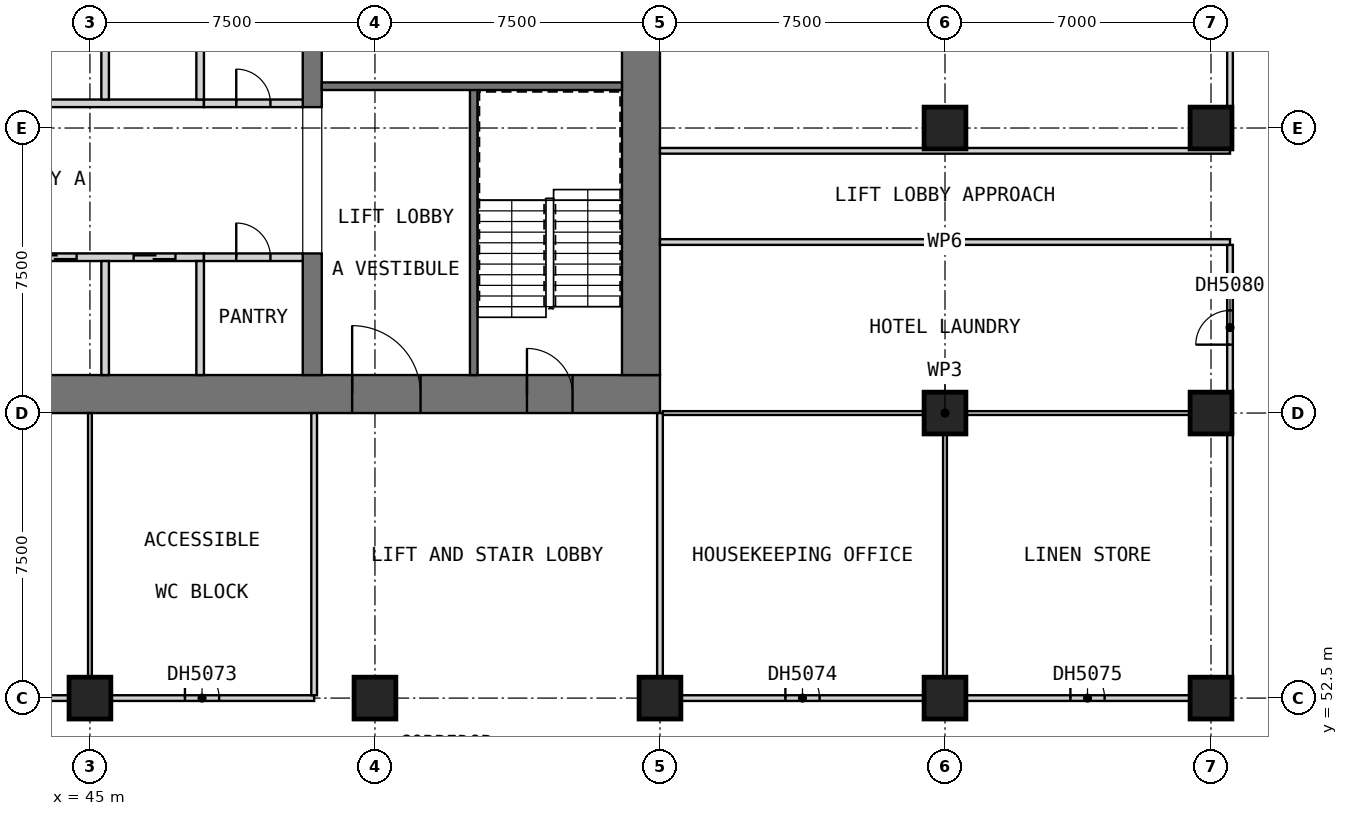
"""IFC4 building model, lengths in metres.
Left out: names, types, materials, properties, quantities, classifications, styles, units other than length and angle.
Written with IfcOpenShell. Run it as: python <this file> out.ifc"""

import sys

from ifc_helpers import new_model, si_unit, direction, frame, frame_2d, origin, origin_2d, place, context, subcontext, project, spatial, rectangle, extrude, element, fill, save


model = new_model("IFC4")
c1 = context("Model", 3, precision=1e-05, world=origin(), true_north=direction((0.0, 1.0)))
c2 = subcontext(c1, "Body", "Model", "MODEL_VIEW")
j1 = project(units=[si_unit("LENGTHUNIT", "METRE"), si_unit("PLANEANGLEUNIT", "RADIAN")], contexts=[c1])
p1 = place(None, origin())
s1 = spatial("IfcSite", under=j1, at=p1, CompositionType="ELEMENT")
p2 = place(p1, origin())
s2 = spatial("IfcBuilding", under=s1, at=p2, CompositionType="ELEMENT")
p3 = place(p2, frame((0.0, 0.0, 79.1)))
s3 = spatial("IfcBuildingStorey", under=s2, at=p3, CompositionType="ELEMENT", Elevation=79.1)
for number, where, z_axis, x_axis in (
    (1, (45.0, 52.5, 0.0), (0.0, 0.0, 1.0), (1.0, 0.0, 0.0)),
    (2, (52.5, 52.5, 0.0), (0.0, 0.0, 1.0), (1.0, 0.0, 0.0)),
    (3, (60.0, 52.5, 0.0), (0.0, 0.0, 1.0), (1.0, 0.0, 0.0)),
    (4, (67.5, 52.5, 0.0), (0.0, 0.0, 1.0), (1.0, 0.0, 0.0)),
    (5, (67.5, 60.0, 0.0), (0.0, 0.0, 1.0), (1.0, 0.0, 0.0)),
    (6, (67.5, 67.5, 0.0), (0.0, 0.0, 1.0), (1.0, 0.0, 0.0)),
    (7, (74.5, 52.5, 0.0), (0.0, 0.0, 1.0), (1.0, 0.0, 0.0)),
    (8, (74.5, 60.0, 0.0), (0.0, 0.0, 1.0), (1.0, 0.0, 0.0)),
    (9, (74.5, 67.5, 0.0), (0.0, 0.0, 1.0), (1.0, 0.0, 0.0)),
):
    element("IfcColumn", number, at=place(p3, frame(where, z_axis=z_axis, x_axis=x_axis)), inside=s3, PredefinedType="COLUMN", context=c2, shape_type="SweptSolid", body=[
        extrude(rectangle(XDim=1.1, YDim=1.1, at=origin_2d()), origin(), (0.0, 0.0, 1.0), 3.6),
    ])
p4 = place(p3, frame((30.0, 60.5, 0.0), z_axis=(0.0, 0.0, 1.0), x_axis=(1.0, 0.0, 0.0)))
e10 = element("IfcWall", 10, at=p4, inside=s3, PredefinedType="SHEAR", context=c2, shape_type="SweptSolid", body=[
    extrude(rectangle(XDim=30.0, YDim=1.0, at=frame_2d((15.0, 0.0))), origin(), (0.0, 0.0, 1.0), 3.6),
])
p5 = place(p4, frame((21.9, 0.0, 0.0)))
e11 = element("IfcOpeningElement", 11, at=p5, cuts=e10, PredefinedType="OPENING", context=c2, shape_type="SweptSolid", body=[
    extrude(rectangle(XDim=1.8, YDim=2.1, at=frame_2d((0.9, 1.05))), frame((0.0, 0.51, 0.0), z_axis=(0.0, -1.0, 0.0), x_axis=(1.0, 0.0, 0.0)), (0.0, 0.0, 1.0), 1.02),
])
p6 = place(p4, frame((26.5, 0.0, 0.0)))
e12 = element("IfcOpeningElement", 12, at=p6, cuts=e10, PredefinedType="OPENING", context=c2, shape_type="SweptSolid", body=[
    extrude(rectangle(XDim=1.2, YDim=2.1, at=frame_2d((0.6, 1.05))), frame((0.0, 0.51, 0.0), z_axis=(0.0, -1.0, 0.0), x_axis=(1.0, 0.0, 0.0)), (0.0, 0.0, 1.0), 1.02),
])
p7 = place(p3, frame((59.5, 61.0, 0.0), z_axis=(0.0, 0.0, 1.0), x_axis=(0.0, 1.0, 0.0)))
e13 = element("IfcWall", 13, at=p7, inside=s3, PredefinedType="SHEAR", context=c2, shape_type="SweptSolid", body=[
    extrude(rectangle(XDim=20.5, YDim=1.0, at=frame_2d((10.25, 0.0))), origin(), (0.0, 0.0, 1.0), 3.6),
])
p8 = place(p7, frame((14.5, 0.0, 0.0)))
e14 = element("IfcOpeningElement", 14, at=p8, cuts=e13, PredefinedType="OPENING", context=c2, shape_type="SweptSolid", body=[
    extrude(rectangle(XDim=1.8, YDim=2.1, at=frame_2d((0.9, 1.05))), frame((0.0, 0.51, 0.0), z_axis=(0.0, -1.0, 0.0), x_axis=(1.0, 0.0, 0.0)), (0.0, 0.0, 1.0), 1.02),
])
p9 = place(p3, frame((50.85, 61.0, 0.0), z_axis=(0.0, 0.0, 1.0), x_axis=(0.0, 1.0, 0.0)))
e15 = element("IfcWall", 15, at=p9, inside=s3, PredefinedType="SHEAR", context=c2, shape_type="SweptSolid", body=[
    extrude(rectangle(XDim=3.2, YDim=0.5, at=frame_2d((1.6, 0.0))), origin(), (0.0, 0.0, 1.0), 3.6),
])
p10 = place(p3, frame((50.85, 68.05, 0.0), z_axis=(0.0, 0.0, 1.0), x_axis=(0.0, 1.0, 0.0)))
e16 = element("IfcWall", 16, at=p10, inside=s3, PredefinedType="SHEAR", context=c2, shape_type="SweptSolid", body=[
    extrude(rectangle(XDim=6.4, YDim=0.5, at=frame_2d((3.2, 0.0))), origin(), (0.0, 0.0, 1.0), 3.6),
])
p11 = place(p3, frame((35.0, 64.1, 0.0), z_axis=(0.0, 0.0, 1.0), x_axis=(1.0, 0.0, 0.0)))
e17 = element("IfcWall", 17, at=p11, inside=s3, PredefinedType="SOLIDWALL", context=c2, shape_type="SweptSolid", body=[
    extrude(rectangle(XDim=13.0, YDim=0.2, at=frame_2d((6.5, 0.0))), origin(), (0.0, 0.0, 1.0), 3.6),
])
p12 = place(p11, frame((0.75, 0.0, 0.0)))
e18 = element("IfcOpeningElement", 18, at=p12, cuts=e17, PredefinedType="OPENING", context=c2, shape_type="SweptSolid", body=[
    extrude(rectangle(XDim=1.1, YDim=2.1, at=frame_2d((0.55, 1.05))), frame((0.0, 0.11, 0.0), z_axis=(0.0, -1.0, 0.0), x_axis=(1.0, 0.0, 0.0)), (0.0, 0.0, 1.0), 0.22),
])
p13 = place(p11, frame((3.35, 0.0, 0.0)))
e19 = element("IfcOpeningElement", 19, at=p13, cuts=e17, PredefinedType="OPENING", context=c2, shape_type="SweptSolid", body=[
    extrude(rectangle(XDim=1.1, YDim=2.1, at=frame_2d((0.55, 1.05))), frame((0.0, 0.11, 0.0), z_axis=(0.0, -1.0, 0.0), x_axis=(1.0, 0.0, 0.0)), (0.0, 0.0, 1.0), 0.22),
])
p14 = place(p11, frame((5.95, 0.0, 0.0)))
e20 = element("IfcOpeningElement", 20, at=p14, cuts=e17, PredefinedType="OPENING", context=c2, shape_type="SweptSolid", body=[
    extrude(rectangle(XDim=1.1, YDim=2.1, at=frame_2d((0.55, 1.05))), frame((0.0, 0.11, 0.0), z_axis=(0.0, -1.0, 0.0), x_axis=(1.0, 0.0, 0.0)), (0.0, 0.0, 1.0), 0.22),
])
p15 = place(p11, frame((8.55, 0.0, 0.0)))
e21 = element("IfcOpeningElement", 21, at=p15, cuts=e17, PredefinedType="OPENING", context=c2, shape_type="SweptSolid", body=[
    extrude(rectangle(XDim=1.1, YDim=2.1, at=frame_2d((0.55, 1.05))), frame((0.0, 0.11, 0.0), z_axis=(0.0, -1.0, 0.0), x_axis=(1.0, 0.0, 0.0)), (0.0, 0.0, 1.0), 0.22),
])
p16 = place(p11, frame((11.15, 0.0, 0.0)))
e22 = element("IfcOpeningElement", 22, at=p16, cuts=e17, PredefinedType="OPENING", context=c2, shape_type="SweptSolid", body=[
    extrude(rectangle(XDim=1.1, YDim=2.1, at=frame_2d((0.55, 1.05))), frame((0.0, 0.11, 0.0), z_axis=(0.0, -1.0, 0.0), x_axis=(1.0, 0.0, 0.0)), (0.0, 0.0, 1.0), 0.22),
])
for number, where, z_axis, x_axis in (
    (23, (45.4, 61.0, 0.0), (0.0, 0.0, 1.0), (0.0, 1.0, 0.0)),
    (24, (47.9, 61.0, 0.0), (0.0, 0.0, 1.0), (0.0, 1.0, 0.0)),
):
    element("IfcWall", number, at=place(p3, frame(where, z_axis=z_axis, x_axis=x_axis)), inside=s3, PredefinedType="SOLIDWALL", context=c2, shape_type="SweptSolid", body=[
        extrude(rectangle(XDim=3.0, YDim=0.2, at=frame_2d((1.5, 0.0))), origin(), (0.0, 0.0, 1.0), 3.6),
    ])
p17 = place(p3, frame((48.0, 64.1, 0.0), z_axis=(0.0, 0.0, 1.0), x_axis=(1.0, 0.0, 0.0)))
e25 = element("IfcWall", 25, at=p17, inside=s3, PredefinedType="PARTITIONING", context=c2, shape_type="SweptSolid", body=[
    extrude(rectangle(XDim=2.6, YDim=0.2, at=frame_2d((1.3, 0.0))), origin(), (0.0, 0.0, 1.0), 3.35),
])
p18 = place(p17, frame((0.85, 0.0, 0.0)))
e26 = element("IfcOpeningElement", 26, at=p18, cuts=e25, PredefinedType="OPENING", context=c2, shape_type="SweptSolid", body=[
    extrude(rectangle(XDim=0.9, YDim=2.1, at=frame_2d((0.45, 1.05))), frame((0.0, 0.11, 0.0), z_axis=(0.0, -1.0, 0.0), x_axis=(1.0, 0.0, 0.0)), (0.0, 0.0, 1.0), 0.22),
])
p19 = place(p3, frame((35.0, 68.15, 0.0), z_axis=(0.0, 0.0, 1.0), x_axis=(1.0, 0.0, 0.0)))
e27 = element("IfcWall", 27, at=p19, inside=s3, PredefinedType="SOLIDWALL", context=c2, shape_type="SweptSolid", body=[
    extrude(rectangle(XDim=13.0, YDim=0.2, at=frame_2d((6.5, 0.0))), origin(), (0.0, 0.0, 1.0), 3.6),
])
p20 = place(p19, frame((0.75, 0.0, 0.0)))
e28 = element("IfcOpeningElement", 28, at=p20, cuts=e27, PredefinedType="OPENING", context=c2, shape_type="SweptSolid", body=[
    extrude(rectangle(XDim=1.1, YDim=2.1, at=frame_2d((0.55, 1.05))), frame((0.0, 0.11, 0.0), z_axis=(0.0, -1.0, 0.0), x_axis=(1.0, 0.0, 0.0)), (0.0, 0.0, 1.0), 0.22),
])
for number, where, z_axis, x_axis in (
    (29, (45.4, 68.25, 0.0), (0.0, 0.0, 1.0), (0.0, 1.0, 0.0)),
    (30, (47.9, 68.25, 0.0), (0.0, 0.0, 1.0), (0.0, 1.0, 0.0)),
):
    element("IfcWall", number, at=place(p3, frame(where, z_axis=z_axis, x_axis=x_axis)), inside=s3, PredefinedType="SOLIDWALL", context=c2, shape_type="SweptSolid", body=[
        extrude(rectangle(XDim=2.75, YDim=0.2, at=frame_2d((1.375, 0.0))), origin(), (0.0, 0.0, 1.0), 3.6),
    ])
p21 = place(p3, frame((48.0, 68.15, 0.0), z_axis=(0.0, 0.0, 1.0), x_axis=(1.0, 0.0, 0.0)))
e31 = element("IfcWall", 31, at=p21, inside=s3, PredefinedType="PARTITIONING", context=c2, shape_type="SweptSolid", body=[
    extrude(rectangle(XDim=2.6, YDim=0.2, at=frame_2d((1.3, 0.0))), origin(), (0.0, 0.0, 1.0), 3.35),
])
p22 = place(p21, frame((0.85, 0.0, 0.0)))
e32 = element("IfcOpeningElement", 32, at=p22, cuts=e31, PredefinedType="OPENING", context=c2, shape_type="SweptSolid", body=[
    extrude(rectangle(XDim=0.9, YDim=2.1, at=frame_2d((0.45, 1.05))), frame((0.0, 0.11, 0.0), z_axis=(0.0, -1.0, 0.0), x_axis=(1.0, 0.0, 0.0)), (0.0, 0.0, 1.0), 0.22),
])
p23 = place(p3, frame((55.1, 61.0, 0.0), z_axis=(0.0, 0.0, 1.0), x_axis=(0.0, 1.0, 0.0)))
e33 = element("IfcWall", 33, at=p23, inside=s3, PredefinedType="SOLIDWALL", context=c2, shape_type="SweptSolid", body=[
    extrude(rectangle(XDim=7.6, YDim=0.2, at=frame_2d((3.8, 0.0))), origin(), (0.0, 0.0, 1.0), 3.35),
])
p24 = place(p3, frame((51.1, 68.6, 0.0), z_axis=(0.0, 0.0, 1.0), x_axis=(1.0, 0.0, 0.0)))
e34 = element("IfcWall", 34, at=p24, inside=s3, PredefinedType="SOLIDWALL", context=c2, shape_type="SweptSolid", body=[
    extrude(rectangle(XDim=7.9, YDim=0.2, at=frame_2d((3.95, 0.0))), origin(), (0.0, 0.0, 1.0), 3.35),
])
p25 = place(p3, frame((33.75, 52.5, 0.0), z_axis=(0.0, 0.0, 1.0), x_axis=(1.0, 0.0, 0.0)))
e35 = element("IfcWall", 35, at=p25, inside=s3, PredefinedType="PARTITIONING", context=c2, shape_type="SweptSolid", body=[
    extrude(rectangle(XDim=17.15, YDim=0.15, at=frame_2d((8.575, 0.0))), origin(), (0.0, 0.0, 1.0), 3.35),
])
p26 = place(p25, frame((5.175, 0.0, 0.0)))
e36 = element("IfcOpeningElement", 36, at=p26, cuts=e35, PredefinedType="OPENING", context=c2, shape_type="SweptSolid", body=[
    extrude(rectangle(XDim=0.9, YDim=2.1, at=frame_2d((0.45, 1.05))), frame((0.0, 0.085, 0.0), z_axis=(0.0, -1.0, 0.0), x_axis=(1.0, 0.0, 0.0)), (0.0, 0.0, 1.0), 0.17),
])
p27 = place(p25, frame((13.75, 0.0, 0.0)))
e37 = element("IfcOpeningElement", 37, at=p27, cuts=e35, PredefinedType="OPENING", context=c2, shape_type="SweptSolid", body=[
    extrude(rectangle(XDim=0.9, YDim=2.1, at=frame_2d((0.45, 1.05))), frame((0.0, 0.085, 0.0), z_axis=(0.0, -1.0, 0.0), x_axis=(1.0, 0.0, 0.0)), (0.0, 0.0, 1.0), 0.17),
])
p28 = place(p3, frame((60.0, 52.5, 0.0), z_axis=(0.0, 0.0, 1.0), x_axis=(1.0, 0.0, 0.0)))
e38 = element("IfcWall", 38, at=p28, inside=s3, PredefinedType="PARTITIONING", context=c2, shape_type="SweptSolid", body=[
    extrude(rectangle(XDim=15.0, YDim=0.15, at=frame_2d((7.5, 0.0))), origin(), (0.0, 0.0, 1.0), 3.35),
])
p29 = place(p28, frame((3.3, 0.0, 0.0)))
e39 = element("IfcOpeningElement", 39, at=p29, cuts=e38, PredefinedType="OPENING", context=c2, shape_type="SweptSolid", body=[
    extrude(rectangle(XDim=0.9, YDim=2.1, at=frame_2d((0.45, 1.05))), frame((0.0, 0.085, 0.0), z_axis=(0.0, -1.0, 0.0), x_axis=(1.0, 0.0, 0.0)), (0.0, 0.0, 1.0), 0.17),
])
p30 = place(p28, frame((10.8, 0.0, 0.0)))
e40 = element("IfcOpeningElement", 40, at=p30, cuts=e38, PredefinedType="OPENING", context=c2, shape_type="SweptSolid", body=[
    extrude(rectangle(XDim=0.9, YDim=2.1, at=frame_2d((0.45, 1.05))), frame((0.0, 0.085, 0.0), z_axis=(0.0, -1.0, 0.0), x_axis=(1.0, 0.0, 0.0)), (0.0, 0.0, 1.0), 0.17),
])
p31 = place(p3, frame((75.0, 52.575, 0.0), z_axis=(0.0, 0.0, 1.0), x_axis=(0.0, 1.0, 0.0)))
e41 = element("IfcWall", 41, at=p31, inside=s3, PredefinedType="PARTITIONING", context=c2, shape_type="SweptSolid", body=[
    extrude(rectangle(XDim=11.85, YDim=0.15, at=frame_2d((5.925, 0.0))), origin(), (0.0, 0.0, 1.0), 3.35),
])
p32 = place(p31, frame((9.225, 0.0, 0.0)))
e42 = element("IfcOpeningElement", 42, at=p32, cuts=e41, PredefinedType="OPENING", context=c2, shape_type="SweptSolid", body=[
    extrude(rectangle(XDim=0.9, YDim=2.1, at=frame_2d((0.45, 1.05))), frame((0.0, 0.085, 0.0), z_axis=(0.0, -1.0, 0.0), x_axis=(1.0, 0.0, 0.0)), (0.0, 0.0, 1.0), 0.17),
])
p33 = place(p3, frame((75.0, 66.975, 0.0), z_axis=(0.0, 0.0, 1.0), x_axis=(0.0, 1.0, 0.0)))
e43 = element("IfcWall", 43, at=p33, inside=s3, PredefinedType="PARTITIONING", context=c2, shape_type="SweptSolid", body=[
    extrude(rectangle(XDim=8.55, YDim=0.15, at=frame_2d((4.275, 0.0))), origin(), (0.0, 0.0, 1.0), 3.35),
])
p34 = place(p33, frame((3.825, 0.0, 0.0)))
e44 = element("IfcOpeningElement", 44, at=p34, cuts=e43, PredefinedType="OPENING", context=c2, shape_type="SweptSolid", body=[
    extrude(rectangle(XDim=0.9, YDim=2.1, at=frame_2d((0.45, 1.05))), frame((0.0, 0.085, 0.0), z_axis=(0.0, -1.0, 0.0), x_axis=(1.0, 0.0, 0.0)), (0.0, 0.0, 1.0), 0.17),
])
p35 = place(p3, frame((60.075, 60.0, 0.0), z_axis=(0.0, 0.0, 1.0), x_axis=(1.0, 0.0, 0.0)))
e45 = element("IfcWall", 45, at=p35, inside=s3, PredefinedType="PARTITIONING", context=c2, shape_type="SweptSolid", body=[
    extrude(rectangle(XDim=14.85, YDim=0.1, at=frame_2d((7.425, 0.0))), origin(), (0.0, 0.0, 1.0), 3.35),
])
p36 = place(p3, frame((45.0, 52.575, 0.0), z_axis=(0.0, 0.0, 1.0), x_axis=(0.0, 1.0, 0.0)))
e46 = element("IfcWall", 46, at=p36, inside=s3, PredefinedType="PARTITIONING", context=c2, shape_type="SweptSolid", body=[
    extrude(rectangle(XDim=7.425, YDim=0.1, at=frame_2d((3.712, 0.0))), origin(), (0.0, 0.0, 1.0), 3.35),
])
p37 = place(p3, frame((67.5, 52.575, 0.0), z_axis=(0.0, 0.0, 1.0), x_axis=(0.0, 1.0, 0.0)))
e47 = element("IfcWall", 47, at=p37, inside=s3, PredefinedType="PARTITIONING", context=c2, shape_type="SweptSolid", body=[
    extrude(rectangle(XDim=7.375, YDim=0.1, at=frame_2d((3.688, 0.0))), origin(), (0.0, 0.0, 1.0), 3.35),
])
for number, where, z_axis, x_axis in (
    (48, (60.0, 64.5, 0.0), (0.0, 0.0, 1.0), (1.0, 0.0, 0.0)),
    (49, (60.0, 66.9, 0.0), (0.0, 0.0, 1.0), (1.0, 0.0, 0.0)),
):
    element("IfcWall", number, at=place(p3, frame(where, z_axis=z_axis, x_axis=x_axis)), inside=s3, PredefinedType="PARTITIONING", context=c2, shape_type="SweptSolid", body=[
        extrude(rectangle(XDim=15.0, YDim=0.15, at=frame_2d((7.5, 0.0))), origin(), (0.0, 0.0, 1.0), 3.35),
    ])
for number, where, z_axis, x_axis in (
    (50, (50.9, 52.575, 0.0), (0.0, 0.0, 1.0), (0.0, 1.0, 0.0)),
    (51, (60.0, 52.575, 0.0), (0.0, 0.0, 1.0), (0.0, 1.0, 0.0)),
):
    element("IfcWall", number, at=place(p3, frame(where, z_axis=z_axis, x_axis=x_axis)), inside=s3, PredefinedType="PARTITIONING", context=c2, shape_type="SweptSolid", body=[
        extrude(rectangle(XDim=7.425, YDim=0.15, at=frame_2d((3.712, 0.0))), origin(), (0.0, 0.0, 1.0), 3.35),
    ])
p38 = place(p15, origin())
e52 = element("IfcDoor", 52, at=p38, inside=s3, OperationType="DOUBLE_DOOR_SLIDING", PredefinedType="DOOR", context=c2, shape_type="SweptSolid", body=[
    extrude(rectangle(XDim=1.1, YDim=2.1, at=frame_2d((0.55, 1.05))), frame((0.0, 0.025, 0.0), z_axis=(0.0, -1.0, 0.0), x_axis=(1.0, 0.0, 0.0)), (0.0, 0.0, 1.0), 0.05),
])
fill(e21, e52)
p39 = place(p16, origin())
e53 = element("IfcDoor", 53, at=p39, inside=s3, OperationType="DOUBLE_DOOR_SLIDING", PredefinedType="DOOR", context=c2, shape_type="SweptSolid", body=[
    extrude(rectangle(XDim=1.1, YDim=2.1, at=frame_2d((0.55, 1.05))), frame((0.0, 0.025, 0.0), z_axis=(0.0, -1.0, 0.0), x_axis=(1.0, 0.0, 0.0)), (0.0, 0.0, 1.0), 0.05),
])
fill(e22, e53)
p40 = place(p18, origin())
e54 = element("IfcDoor", 54, at=p40, inside=s3, OperationType="SINGLE_SWING_RIGHT", PredefinedType="DOOR", context=c2, shape_type="SweptSolid", body=[
    extrude(rectangle(XDim=0.9, YDim=2.1, at=frame_2d((0.45, 1.05))), frame((0.0, 0.025, 0.0), z_axis=(0.0, -1.0, 0.0), x_axis=(1.0, 0.0, 0.0)), (0.0, 0.0, 1.0), 0.05),
])
fill(e26, e54)
p41 = place(p22, origin())
e55 = element("IfcDoor", 55, at=p41, inside=s3, OperationType="SINGLE_SWING_RIGHT", PredefinedType="DOOR", context=c2, shape_type="SweptSolid", body=[
    extrude(rectangle(XDim=0.9, YDim=2.1, at=frame_2d((0.45, 1.05))), frame((0.0, 0.025, 0.0), z_axis=(0.0, -1.0, 0.0), x_axis=(1.0, 0.0, 0.0)), (0.0, 0.0, 1.0), 0.05),
])
fill(e32, e55)
p42 = place(p5, origin())
e56 = element("IfcDoor", 56, at=p42, inside=s3, OperationType="DOUBLE_DOOR_SINGLE_SWING", PredefinedType="DOOR", context=c2, shape_type="SweptSolid", body=[
    extrude(rectangle(XDim=1.8, YDim=2.1, at=frame_2d((0.9, 1.05))), frame((0.0, 0.025, 0.0), z_axis=(0.0, -1.0, 0.0), x_axis=(1.0, 0.0, 0.0)), (0.0, 0.0, 1.0), 0.05),
])
fill(e11, e56)
p43 = place(p6, origin())
e57 = element("IfcDoor", 57, at=p43, inside=s3, OperationType="SINGLE_SWING_LEFT", PredefinedType="DOOR", context=c2, shape_type="SweptSolid", body=[
    extrude(rectangle(XDim=1.2, YDim=2.1, at=frame_2d((0.6, 1.05))), frame((0.0, 0.025, 0.0), z_axis=(0.0, -1.0, 0.0), x_axis=(1.0, 0.0, 0.0)), (0.0, 0.0, 1.0), 0.05),
])
fill(e12, e57)
p44 = place(p27, origin())
e58 = element("IfcDoor", 58, at=p44, inside=s3, OperationType="SINGLE_SWING_LEFT", PredefinedType="DOOR", context=c2, shape_type="SweptSolid", body=[
    extrude(rectangle(XDim=0.9, YDim=2.1, at=frame_2d((0.45, 1.05))), frame((0.0, 0.025, 0.0), z_axis=(0.0, -1.0, 0.0), x_axis=(1.0, 0.0, 0.0)), (0.0, 0.0, 1.0), 0.05),
])
fill(e37, e58)
p45 = place(p29, origin())
e59 = element("IfcDoor", 59, at=p45, inside=s3, OperationType="SINGLE_SWING_LEFT", PredefinedType="DOOR", context=c2, shape_type="SweptSolid", body=[
    extrude(rectangle(XDim=0.9, YDim=2.1, at=frame_2d((0.45, 1.05))), frame((0.0, 0.025, 0.0), z_axis=(0.0, -1.0, 0.0), x_axis=(1.0, 0.0, 0.0)), (0.0, 0.0, 1.0), 0.05),
])
fill(e39, e59)
p46 = place(p30, origin())
e60 = element("IfcDoor", 60, at=p46, inside=s3, OperationType="SINGLE_SWING_LEFT", PredefinedType="DOOR", context=c2, shape_type="SweptSolid", body=[
    extrude(rectangle(XDim=0.9, YDim=2.1, at=frame_2d((0.45, 1.05))), frame((0.0, 0.025, 0.0), z_axis=(0.0, -1.0, 0.0), x_axis=(1.0, 0.0, 0.0)), (0.0, 0.0, 1.0), 0.05),
])
fill(e40, e60)
p47 = place(p32, origin())
e61 = element("IfcDoor", 61, at=p47, inside=s3, OperationType="SINGLE_SWING_LEFT", PredefinedType="DOOR", context=c2, shape_type="SweptSolid", body=[
    extrude(rectangle(XDim=0.9, YDim=2.1, at=frame_2d((0.45, 1.05))), frame((0.0, 0.025, 0.0), z_axis=(0.0, -1.0, 0.0), x_axis=(1.0, 0.0, 0.0)), (0.0, 0.0, 1.0), 0.05),
])
fill(e42, e61)
save(model, sys.argv[1])
